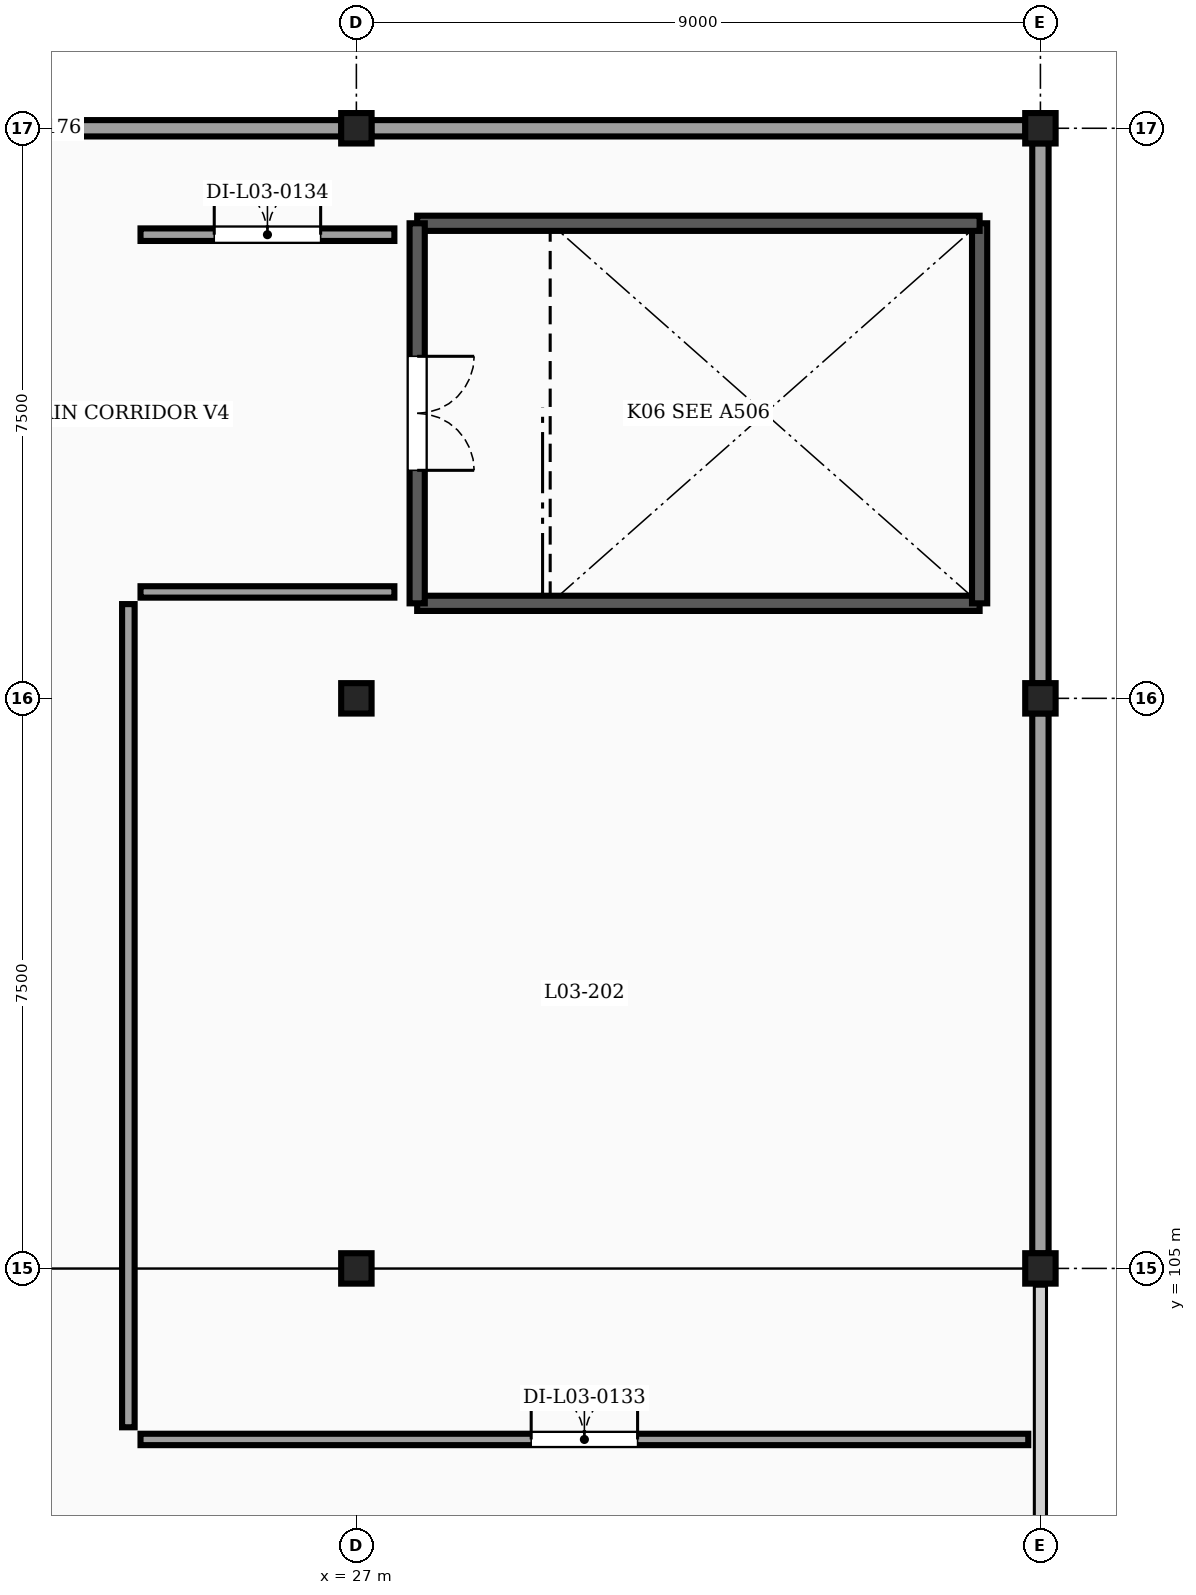
"""IFC4 building model, lengths in metres.
Left out: names, types, materials, properties, quantities, classifications, styles, units other than length and angle.
Written with IfcOpenShell. Run it as: python <this file> out.ifc"""

import sys

from ifc_helpers import new_model, si_unit, direction, frame, frame_2d, origin, origin_2d, place, context, subcontext, project, spatial, rectangle, extrude, element, fill, save


model = new_model("IFC4")
c1 = context("Model", 3, precision=1e-05, world=origin(), true_north=direction((0.0, 1.0)))
c2 = subcontext(c1, "Body", "Model", "MODEL_VIEW")
j1 = project(units=[si_unit("LENGTHUNIT", "METRE"), si_unit("PLANEANGLEUNIT", "RADIAN")], contexts=[c1])
p1 = place(None, origin())
s1 = spatial("IfcSite", under=j1, at=p1, CompositionType="ELEMENT")
p2 = place(p1, origin())
s2 = spatial("IfcBuilding", under=s1, at=p2, CompositionType="ELEMENT")
p3 = place(p2, frame((0.0, 0.0, 12.3)))
s3 = spatial("IfcBuildingStorey", under=s2, at=p3, CompositionType="ELEMENT", Elevation=12.3)
for number, where, z_axis, x_axis in (
    (1, (27.0, 105.0, 0.0), (0.0, 0.0, 1.0), (1.0, 0.0, 0.0)),
    (2, (36.0, 105.0, 0.0), (0.0, 0.0, 1.0), (1.0, 0.0, 0.0)),
    (3, (27.0, 112.5, 0.0), (0.0, 0.0, 1.0), (1.0, 0.0, 0.0)),
    (4, (36.0, 112.5, 0.0), (0.0, 0.0, 1.0), (1.0, 0.0, 0.0)),
    (5, (27.0, 120.0, 0.0), (0.0, 0.0, 1.0), (1.0, 0.0, 0.0)),
    (6, (36.0, 120.0, 0.0), (0.0, 0.0, 1.0), (1.0, 0.0, 0.0)),
):
    element("IfcColumn", number, at=place(p3, frame(where, z_axis=z_axis, x_axis=x_axis)), inside=s3, PredefinedType="COLUMN", context=c2, shape_type="SweptSolid", body=[
        extrude(rectangle(XDim=0.4, YDim=0.4, at=origin_2d()), origin(), (0.0, 0.0, 1.0), 3.65),
    ])
for number, where, z_axis, x_axis in (
    (7, (18.196, 120.0, 0.0), (0.0, 0.0, 1.0), (1.0, 0.0, 0.0)),
    (8, (27.196, 120.0, 0.0), (0.0, 0.0, 1.0), (1.0, 0.0, 0.0)),
):
    element("IfcWall", number, at=place(p3, frame(where, z_axis=z_axis, x_axis=x_axis)), inside=s3, PredefinedType="SOLIDWALL", context=c2, shape_type="SweptSolid", body=[
        extrude(rectangle(XDim=8.608, YDim=0.215, at=frame_2d((4.304, 0.0))), origin(), (0.0, 0.0, 1.0), 3.057),
    ])
for number, where, z_axis, x_axis in (
    (9, (36.0, 119.804, 0.0), (0.0, 0.0, 1.0), (0.0, -1.0, 0.0)),
    (10, (36.0, 112.304, 0.0), (0.0, 0.0, 1.0), (0.0, -1.0, 0.0)),
):
    element("IfcWall", number, at=place(p3, frame(where, z_axis=z_axis, x_axis=x_axis)), inside=s3, PredefinedType="SOLIDWALL", context=c2, shape_type="SweptSolid", body=[
        extrude(rectangle(XDim=7.108, YDim=0.215, at=frame_2d((3.554, 0.0))), origin(), (0.0, 0.0, 1.0), 3.057),
    ])
p4 = place(p3, frame((27.8, 113.75, 0.0), z_axis=(0.0, 0.0, 1.0), x_axis=(1.0, 0.0, 0.0)))
e11 = element("IfcWall", 11, at=p4, inside=s3, PredefinedType="SHEAR", context=c2, shape_type="SweptSolid", body=[
    extrude(rectangle(XDim=7.4, YDim=0.2, at=frame_2d((3.7, 0.0))), origin(), (0.0, 0.0, 1.0), 3.65),
])
p5 = place(p3, frame((35.2, 113.75, 0.0), z_axis=(0.0, 0.0, 1.0), x_axis=(0.0, 1.0, 0.0)))
e12 = element("IfcWall", 12, at=p5, inside=s3, PredefinedType="SHEAR", context=c2, shape_type="SweptSolid", body=[
    extrude(rectangle(XDim=5.0, YDim=0.2, at=frame_2d((2.5, 0.0))), origin(), (0.0, 0.0, 1.0), 3.65),
])
p6 = place(p3, frame((35.2, 118.75, 0.0), z_axis=(0.0, 0.0, 1.0), x_axis=(-1.0, 0.0, 0.0)))
e13 = element("IfcWall", 13, at=p6, inside=s3, PredefinedType="SHEAR", context=c2, shape_type="SweptSolid", body=[
    extrude(rectangle(XDim=7.4, YDim=0.2, at=frame_2d((3.7, 0.0))), origin(), (0.0, 0.0, 1.0), 3.65),
])
p7 = place(p3, frame((27.8, 118.75, 0.0), z_axis=(0.0, 0.0, 1.0), x_axis=(0.0, -1.0, 0.0)))
e14 = element("IfcWall", 14, at=p7, inside=s3, PredefinedType="SHEAR", context=c2, shape_type="SweptSolid", body=[
    extrude(rectangle(XDim=5.0, YDim=0.2, at=frame_2d((2.5, 0.0))), origin(), (0.0, 0.0, 1.0), 3.65),
])
p8 = place(p7, frame((1.75, 0.0, 0.0)))
e15 = element("IfcOpeningElement", 15, at=p8, cuts=e14, PredefinedType="OPENING", context=c2, shape_type="SweptSolid", body=[
    extrude(rectangle(XDim=1.5, YDim=2.15, at=frame_2d((0.75, 1.075))), frame((0.0, 0.11, 0.0), z_axis=(0.0, -1.0, 0.0), x_axis=(1.0, 0.0, 0.0)), (0.0, 0.0, 1.0), 0.22),
])
p9 = place(p3, frame((27.5, 113.9, 0.0), z_axis=(0.0, 0.0, 1.0), x_axis=(-1.0, 0.0, 0.0)))
e16 = element("IfcWall", 16, at=p9, inside=s3, PredefinedType="PARTITIONING", context=c2, shape_type="SweptSolid", body=[
    extrude(rectangle(XDim=3.34, YDim=0.15, at=frame_2d((1.67, 0.0))), origin(), (0.0, 0.0, 1.0), 3.65),
])
p10 = place(p3, frame((24.0, 113.74, 0.0), z_axis=(0.0, 0.0, 1.0), x_axis=(0.0, -1.0, 0.0)))
e17 = element("IfcWall", 17, at=p10, inside=s3, PredefinedType="PARTITIONING", context=c2, shape_type="SweptSolid", body=[
    extrude(rectangle(XDim=10.83, YDim=0.165, at=frame_2d((5.415, 0.0))), origin(), (0.0, 0.0, 1.0), 3.342),
])
p11 = place(p3, frame((24.16, 102.75, 0.0), z_axis=(0.0, 0.0, 1.0), x_axis=(1.0, 0.0, 0.0)))
e18 = element("IfcWall", 18, at=p11, inside=s3, PredefinedType="PARTITIONING", context=c2, shape_type="SweptSolid", body=[
    extrude(rectangle(XDim=11.68, YDim=0.15, at=frame_2d((5.84, 0.0))), origin(), (0.0, 0.0, 1.0), 3.65),
])
p12 = place(p11, frame((5.14, 0.0, 0.0)))
e19 = element("IfcOpeningElement", 19, at=p12, cuts=e18, PredefinedType="OPENING", context=c2, shape_type="SweptSolid", body=[
    extrude(rectangle(XDim=1.4, YDim=2.15, at=frame_2d((0.7, 1.075))), frame((0.0, 0.085, 0.0), z_axis=(0.0, -1.0, 0.0), x_axis=(1.0, 0.0, 0.0)), (0.0, 0.0, 1.0), 0.17),
])
p13 = place(p3, frame((24.16, 118.6, 0.0), z_axis=(0.0, 0.0, 1.0), x_axis=(1.0, 0.0, 0.0)))
e20 = element("IfcWall", 20, at=p13, inside=s3, PredefinedType="PARTITIONING", context=c2, shape_type="SweptSolid", body=[
    extrude(rectangle(XDim=3.34, YDim=0.165, at=frame_2d((1.67, 0.0))), origin(), (0.0, 0.0, 1.0), 3.65),
])
p14 = place(p13, frame((0.97, 0.0, 0.0)))
e21 = element("IfcOpeningElement", 21, at=p14, cuts=e20, PredefinedType="OPENING", context=c2, shape_type="SweptSolid", body=[
    extrude(rectangle(XDim=1.4, YDim=2.15, at=frame_2d((0.7, 1.075))), frame((0.0, 0.093, 0.0), z_axis=(0.0, -1.0, 0.0), x_axis=(1.0, 0.0, 0.0)), (0.0, 0.0, 1.0), 0.185),
])
p15 = place(p8, origin())
e22 = element("IfcDoor", 22, at=p15, inside=s3, OperationType="DOUBLE_DOOR_SINGLE_SWING", PredefinedType="DOOR", context=c2, shape_type="SweptSolid", body=[
    extrude(rectangle(XDim=1.5, YDim=2.15, at=frame_2d((0.75, 1.075))), frame((0.0, 0.025, 0.0), z_axis=(0.0, -1.0, 0.0), x_axis=(1.0, 0.0, 0.0)), (0.0, 0.0, 1.0), 0.05),
])
fill(e15, e22)
p16 = place(p12, origin())
e23 = element("IfcDoor", 23, at=p16, inside=s3, OperationType="DOUBLE_DOOR_SINGLE_SWING", PredefinedType="DOOR", context=c2, shape_type="SweptSolid", body=[
    extrude(rectangle(XDim=1.4, YDim=2.15, at=frame_2d((0.7, 1.075))), frame((0.0, 0.025, 0.0), z_axis=(0.0, -1.0, 0.0), x_axis=(1.0, 0.0, 0.0)), (0.0, 0.0, 1.0), 0.05),
])
fill(e19, e23)
p17 = place(p14, origin())
e24 = element("IfcDoor", 24, at=p17, inside=s3, OperationType="DOUBLE_DOOR_SINGLE_SWING", PredefinedType="DOOR", context=c2, shape_type="SweptSolid", body=[
    extrude(rectangle(XDim=1.4, YDim=2.15, at=frame_2d((0.7, 1.075))), frame((0.0, 0.025, 0.0), z_axis=(0.0, -1.0, 0.0), x_axis=(1.0, 0.0, 0.0)), (0.0, 0.0, 1.0), 0.05),
])
fill(e21, e24)
save(model, sys.argv[1])
